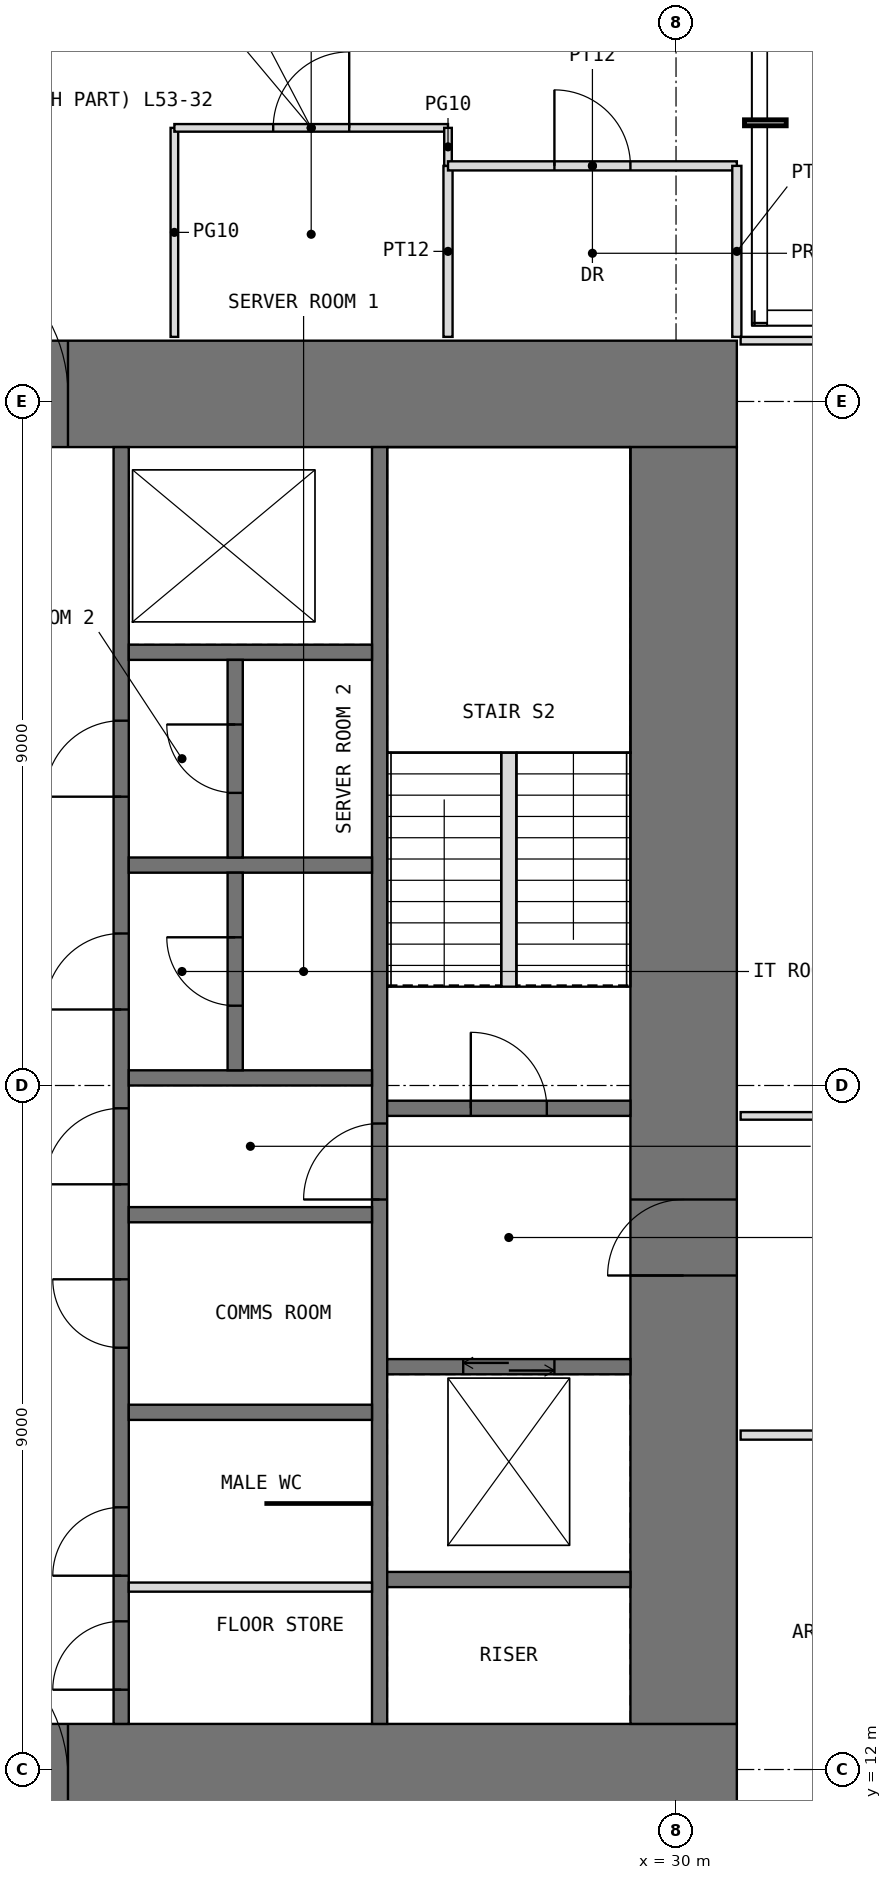
"""IFC4 building model, lengths in metres.
Left out: names, types, materials, properties, quantities, classifications, styles, units other than length and angle.
Written with IfcOpenShell. Run it as: python <this file> out.ifc"""

import sys

from ifc_helpers import new_model, si_unit, direction, frame, frame_2d, origin, place, context, subcontext, project, spatial, rectangle, extrude, element, fill, save


model = new_model("IFC4")
c1 = context("Model", 3, precision=1e-05, world=origin(), true_north=direction((0.0, 1.0)))
c2 = subcontext(c1, "Body", "Model", "MODEL_VIEW")
j1 = project(units=[si_unit("LENGTHUNIT", "METRE"), si_unit("PLANEANGLEUNIT", "RADIAN")], contexts=[c1])
p1 = place(None, origin())
s1 = spatial("IfcSite", under=j1, at=p1, CompositionType="ELEMENT")
p2 = place(p1, origin())
s2 = spatial("IfcBuilding", under=s1, at=p2, CompositionType="ELEMENT")
p3 = place(p2, frame((0.0, 0.0, 222.5)))
s3 = spatial("IfcBuildingStorey", under=s2, at=p3, CompositionType="ELEMENT", Elevation=222.5)
p4 = place(p3, frame((11.2, 11.9, -0.05), z_axis=(0.0, 0.0, 1.0), x_axis=(1.0, 0.0, 0.0)))
e1 = element("IfcWall", 1, at=p4, inside=s3, PredefinedType="SHEAR", context=c2, shape_type="SweptSolid", body=[
    extrude(rectangle(XDim=19.6, YDim=1.4, at=frame_2d((9.8, 0.0))), origin(), (0.0, 0.0, 1.0), 4.0),
])
p5 = place(p4, frame((8.8, 0.0, 0.05)))
e2 = element("IfcOpeningElement", 2, at=p5, cuts=e1, PredefinedType="OPENING", context=c2, shape_type="SweptSolid", body=[
    extrude(rectangle(XDim=2.0, YDim=2.2, at=frame_2d((1.0, 1.1))), frame((0.0, 0.71, 0.0), z_axis=(0.0, -1.0, 0.0), x_axis=(1.0, 0.0, 0.0)), (0.0, 0.0, 1.0), 1.42),
])
p6 = place(p3, frame((11.2, 30.1, -0.05), z_axis=(0.0, 0.0, 1.0), x_axis=(1.0, 0.0, 0.0)))
e3 = element("IfcWall", 3, at=p6, inside=s3, PredefinedType="SHEAR", context=c2, shape_type="SweptSolid", body=[
    extrude(rectangle(XDim=19.6, YDim=1.4, at=frame_2d((9.8, 0.0))), origin(), (0.0, 0.0, 1.0), 4.0),
])
p7 = place(p6, frame((8.8, 0.0, 0.05)))
e4 = element("IfcOpeningElement", 4, at=p7, cuts=e3, PredefinedType="OPENING", context=c2, shape_type="SweptSolid", body=[
    extrude(rectangle(XDim=2.0, YDim=2.2, at=frame_2d((1.0, 1.1))), frame((0.0, 0.71, 0.0), z_axis=(0.0, -1.0, 0.0), x_axis=(1.0, 0.0, 0.0)), (0.0, 0.0, 1.0), 1.42),
])
p8 = place(p3, frame((30.1, 12.6, -0.05), z_axis=(0.0, 0.0, 1.0), x_axis=(0.0, 1.0, 0.0)))
e5 = element("IfcWall", 5, at=p8, inside=s3, PredefinedType="SHEAR", context=c2, shape_type="SweptSolid", body=[
    extrude(rectangle(XDim=16.8, YDim=1.4, at=frame_2d((8.4, 0.0))), origin(), (0.0, 0.0, 1.0), 4.0),
])
p9 = place(p8, frame((5.9, 0.0, 0.05)))
e6 = element("IfcOpeningElement", 6, at=p9, cuts=e5, PredefinedType="OPENING", context=c2, shape_type="SweptSolid", body=[
    extrude(rectangle(XDim=1.0, YDim=2.2, at=frame_2d((0.5, 1.1))), frame((0.0, 0.71, 0.0), z_axis=(0.0, -1.0, 0.0), x_axis=(1.0, 0.0, 0.0)), (0.0, 0.0, 1.0), 1.42),
])
p10 = place(p3, frame((22.7, 12.6, -0.05), z_axis=(0.0, 0.0, 1.0), x_axis=(0.0, 1.0, 0.0)))
e7 = element("IfcWall", 7, at=p10, inside=s3, PredefinedType="SHEAR", context=c2, shape_type="SweptSolid", body=[
    extrude(rectangle(XDim=16.8, YDim=0.2, at=frame_2d((8.4, 0.0))), origin(), (0.0, 0.0, 1.0), 4.0),
])
p11 = place(p10, frame((0.45, 0.0, 0.05)))
e8 = element("IfcOpeningElement", 8, at=p11, cuts=e7, PredefinedType="OPENING", context=c2, shape_type="SweptSolid", body=[
    extrude(rectangle(XDim=0.9, YDim=2.2, at=frame_2d((0.45, 1.1))), frame((0.0, 0.11, 0.0), z_axis=(0.0, -1.0, 0.0), x_axis=(1.0, 0.0, 0.0)), (0.0, 0.0, 1.0), 0.22),
])
p12 = place(p10, frame((7.1, 0.0, 0.05)))
e9 = element("IfcOpeningElement", 9, at=p12, cuts=e7, PredefinedType="OPENING", context=c2, shape_type="SweptSolid", body=[
    extrude(rectangle(XDim=1.0, YDim=2.2, at=frame_2d((0.5, 1.1))), frame((0.0, 0.11, 0.0), z_axis=(0.0, -1.0, 0.0), x_axis=(1.0, 0.0, 0.0)), (0.0, 0.0, 1.0), 0.22),
])
p13 = place(p10, frame((1.95, 0.0, 0.05)))
e10 = element("IfcOpeningElement", 10, at=p13, cuts=e7, PredefinedType="OPENING", context=c2, shape_type="SweptSolid", body=[
    extrude(rectangle(XDim=0.9, YDim=2.2, at=frame_2d((0.45, 1.1))), frame((0.0, 0.11, 0.0), z_axis=(0.0, -1.0, 0.0), x_axis=(1.0, 0.0, 0.0)), (0.0, 0.0, 1.0), 0.22),
])
p14 = place(p10, frame((4.95, 0.0, 0.05)))
e11 = element("IfcOpeningElement", 11, at=p14, cuts=e7, PredefinedType="OPENING", context=c2, shape_type="SweptSolid", body=[
    extrude(rectangle(XDim=0.9, YDim=2.2, at=frame_2d((0.45, 1.1))), frame((0.0, 0.11, 0.0), z_axis=(0.0, -1.0, 0.0), x_axis=(1.0, 0.0, 0.0)), (0.0, 0.0, 1.0), 0.22),
])
p15 = place(p10, frame((9.4, 0.0, 0.05)))
e12 = element("IfcOpeningElement", 12, at=p15, cuts=e7, PredefinedType="OPENING", context=c2, shape_type="SweptSolid", body=[
    extrude(rectangle(XDim=1.0, YDim=2.2, at=frame_2d((0.5, 1.1))), frame((0.0, 0.11, 0.0), z_axis=(0.0, -1.0, 0.0), x_axis=(1.0, 0.0, 0.0)), (0.0, 0.0, 1.0), 0.22),
])
p16 = place(p10, frame((12.2, 0.0, 0.05)))
e13 = element("IfcOpeningElement", 13, at=p16, cuts=e7, PredefinedType="OPENING", context=c2, shape_type="SweptSolid", body=[
    extrude(rectangle(XDim=1.0, YDim=2.2, at=frame_2d((0.5, 1.1))), frame((0.0, 0.11, 0.0), z_axis=(0.0, -1.0, 0.0), x_axis=(1.0, 0.0, 0.0)), (0.0, 0.0, 1.0), 0.22),
])
p17 = place(p3, frame((26.1, 12.6, -0.05), z_axis=(0.0, 0.0, 1.0), x_axis=(0.0, 1.0, 0.0)))
e14 = element("IfcWall", 14, at=p17, inside=s3, PredefinedType="SHEAR", context=c2, shape_type="SweptSolid", body=[
    extrude(rectangle(XDim=16.8, YDim=0.2, at=frame_2d((8.4, 0.0))), origin(), (0.0, 0.0, 1.0), 4.0),
])
p18 = place(p17, frame((6.9, 0.0, 0.05)))
e15 = element("IfcOpeningElement", 15, at=p18, cuts=e14, PredefinedType="OPENING", context=c2, shape_type="SweptSolid", body=[
    extrude(rectangle(XDim=1.0, YDim=2.2, at=frame_2d((0.5, 1.1))), frame((0.0, 0.11, 0.0), z_axis=(0.0, -1.0, 0.0), x_axis=(1.0, 0.0, 0.0)), (0.0, 0.0, 1.0), 0.22),
])
for number, where, z_axis, x_axis in (
    (16, (22.8, 16.7, -0.05), (0.0, 0.0, 1.0), (1.0, 0.0, 0.0)),
    (17, (22.8, 19.3, -0.05), (0.0, 0.0, 1.0), (1.0, 0.0, 0.0)),
    (18, (22.8, 21.1, -0.05), (0.0, 0.0, 1.0), (1.0, 0.0, 0.0)),
    (19, (22.8, 23.9, -0.05), (0.0, 0.0, 1.0), (1.0, 0.0, 0.0)),
    (20, (22.8, 26.7, -0.05), (0.0, 0.0, 1.0), (1.0, 0.0, 0.0)),
    (21, (26.2, 14.5, -0.05), (0.0, 0.0, 1.0), (1.0, 0.0, 0.0)),
):
    element("IfcWall", number, at=place(p3, frame(where, z_axis=z_axis, x_axis=x_axis)), inside=s3, PredefinedType="SHEAR", context=c2, shape_type="SweptSolid", body=[
        extrude(rectangle(XDim=3.2, YDim=0.2, at=frame_2d((1.6, 0.0))), origin(), (0.0, 0.0, 1.0), 4.0),
    ])
p19 = place(p3, frame((26.2, 17.3, -0.05), z_axis=(0.0, 0.0, 1.0), x_axis=(1.0, 0.0, 0.0)))
e22 = element("IfcWall", 22, at=p19, inside=s3, PredefinedType="SHEAR", context=c2, shape_type="SweptSolid", body=[
    extrude(rectangle(XDim=3.2, YDim=0.2, at=frame_2d((1.6, 0.0))), origin(), (0.0, 0.0, 1.0), 4.0),
])
p20 = place(p19, frame((1.0, 0.0, 0.05)))
e23 = element("IfcOpeningElement", 23, at=p20, cuts=e22, PredefinedType="OPENING", context=c2, shape_type="SweptSolid", body=[
    extrude(rectangle(XDim=1.2, YDim=2.2, at=frame_2d((0.6, 1.1))), frame((0.0, 0.11, 0.0), z_axis=(0.0, -1.0, 0.0), x_axis=(1.0, 0.0, 0.0)), (0.0, 0.0, 1.0), 0.22),
])
p21 = place(p3, frame((26.2, 20.7, -0.05), z_axis=(0.0, 0.0, 1.0), x_axis=(1.0, 0.0, 0.0)))
e24 = element("IfcWall", 24, at=p21, inside=s3, PredefinedType="SHEAR", context=c2, shape_type="SweptSolid", body=[
    extrude(rectangle(XDim=3.2, YDim=0.2, at=frame_2d((1.6, 0.0))), origin(), (0.0, 0.0, 1.0), 4.0),
])
p22 = place(p21, frame((1.1, 0.0, 0.05)))
e25 = element("IfcOpeningElement", 25, at=p22, cuts=e24, PredefinedType="OPENING", context=c2, shape_type="SweptSolid", body=[
    extrude(rectangle(XDim=1.0, YDim=2.2, at=frame_2d((0.5, 1.1))), frame((0.0, 0.11, 0.0), z_axis=(0.0, -1.0, 0.0), x_axis=(1.0, 0.0, 0.0)), (0.0, 0.0, 1.0), 0.22),
])
p23 = place(p3, frame((22.8, 14.4, 0.0), z_axis=(0.0, 0.0, 1.0), x_axis=(1.0, 0.0, 0.0)))
e26 = element("IfcWall", 26, at=p23, inside=s3, PredefinedType="PARTITIONING", context=c2, shape_type="SweptSolid", body=[
    extrude(rectangle(XDim=3.2, YDim=0.12, at=frame_2d((1.6, 0.0))), origin(), (0.0, 0.0, 1.0), 3.75),
])
p24 = place(p3, frame((24.6, 15.5, 0.0), z_axis=(0.0, 0.0, 1.0), x_axis=(1.0, 0.0, 0.0)))
e27 = element("IfcWall", 27, at=p24, inside=s3, PredefinedType="PARTITIONING", context=c2, shape_type="SweptSolid", body=[
    extrude(rectangle(XDim=1.4, YDim=0.03, at=frame_2d((0.7, 0.0))), origin(), (0.0, 0.0, 1.0), 3.75),
])
p25 = place(p3, frame((24.2, 21.2, -0.05), z_axis=(0.0, 0.0, 1.0), x_axis=(0.0, 1.0, 0.0)))
e28 = element("IfcWall", 28, at=p25, inside=s3, PredefinedType="SHEAR", context=c2, shape_type="SweptSolid", body=[
    extrude(rectangle(XDim=2.6, YDim=0.2, at=frame_2d((1.3, 0.0))), origin(), (0.0, 0.0, 1.0), 4.0),
])
p26 = place(p25, frame((0.85, 0.0, 0.05)))
e29 = element("IfcOpeningElement", 29, at=p26, cuts=e28, PredefinedType="OPENING", context=c2, shape_type="SweptSolid", body=[
    extrude(rectangle(XDim=0.9, YDim=2.2, at=frame_2d((0.45, 1.1))), frame((0.0, 0.11, 0.0), z_axis=(0.0, -1.0, 0.0), x_axis=(1.0, 0.0, 0.0)), (0.0, 0.0, 1.0), 0.22),
])
p27 = place(p3, frame((24.2, 24.0, -0.05), z_axis=(0.0, 0.0, 1.0), x_axis=(0.0, 1.0, 0.0)))
e30 = element("IfcWall", 30, at=p27, inside=s3, PredefinedType="SHEAR", context=c2, shape_type="SweptSolid", body=[
    extrude(rectangle(XDim=2.6, YDim=0.2, at=frame_2d((1.3, 0.0))), origin(), (0.0, 0.0, 1.0), 4.0),
])
p28 = place(p27, frame((0.85, 0.0, 0.05)))
e31 = element("IfcOpeningElement", 31, at=p28, cuts=e30, PredefinedType="OPENING", context=c2, shape_type="SweptSolid", body=[
    extrude(rectangle(XDim=0.9, YDim=2.2, at=frame_2d((0.45, 1.1))), frame((0.0, 0.11, 0.0), z_axis=(0.0, -1.0, 0.0), x_axis=(1.0, 0.0, 0.0)), (0.0, 0.0, 1.0), 0.22),
])
p29 = place(p3, frame((23.4, 30.85, 0.0), z_axis=(0.0, 0.0, 1.0), x_axis=(0.0, 1.0, 0.0)))
e32 = element("IfcWall", 32, at=p29, inside=s3, PredefinedType="PARTITIONING", context=c2, shape_type="SweptSolid", body=[
    extrude(rectangle(XDim=2.75, YDim=0.1, at=frame_2d((1.375, 0.0))), origin(), (0.0, 0.0, 1.0), 3.75),
])
p30 = place(p3, frame((23.4, 33.6, 0.0), z_axis=(0.0, 0.0, 1.0), x_axis=(1.0, 0.0, 0.0)))
e33 = element("IfcWall", 33, at=p30, inside=s3, PredefinedType="PARTITIONING", context=c2, shape_type="SweptSolid", body=[
    extrude(rectangle(XDim=3.6, YDim=0.1, at=frame_2d((1.8, 0.0))), origin(), (0.0, 0.0, 1.0), 3.75),
])
p31 = place(p30, frame((1.3, 0.0, 0.0)))
e34 = element("IfcOpeningElement", 34, at=p31, cuts=e33, PredefinedType="OPENING", context=c2, shape_type="SweptSolid", body=[
    extrude(rectangle(XDim=1.0, YDim=2.4, at=frame_2d((0.5, 1.2))), frame((0.0, 0.06, 0.0), z_axis=(0.0, -1.0, 0.0), x_axis=(1.0, 0.0, 0.0)), (0.0, 0.0, 1.0), 0.12),
])
p32 = place(p3, frame((27.0, 30.85, 0.0), z_axis=(0.0, 0.0, 1.0), x_axis=(0.0, 1.0, 0.0)))
e35 = element("IfcWall", 35, at=p32, inside=s3, PredefinedType="PARTITIONING", context=c2, shape_type="SweptSolid", body=[
    extrude(rectangle(XDim=2.25, YDim=0.12, at=frame_2d((1.125, 0.0))), origin(), (0.0, 0.0, 1.0), 3.75),
])
p33 = place(p3, frame((27.0, 33.1, 0.0), z_axis=(0.0, 0.0, 1.0), x_axis=(0.0, 1.0, 0.0)))
e36 = element("IfcWall", 36, at=p33, inside=s3, PredefinedType="PARTITIONING", context=c2, shape_type="SweptSolid", body=[
    extrude(rectangle(XDim=0.5, YDim=0.1, at=frame_2d((0.25, 0.0))), origin(), (0.0, 0.0, 1.0), 3.75),
])
p34 = place(p3, frame((27.0, 33.1, 0.0), z_axis=(0.0, 0.0, 1.0), x_axis=(1.0, 0.0, 0.0)))
e37 = element("IfcWall", 37, at=p34, inside=s3, PredefinedType="PARTITIONING", context=c2, shape_type="SweptSolid", body=[
    extrude(rectangle(XDim=3.8, YDim=0.12, at=frame_2d((1.9, 0.0))), origin(), (0.0, 0.0, 1.0), 3.75),
])
p35 = place(p34, frame((1.4, 0.0, 0.0)))
e38 = element("IfcOpeningElement", 38, at=p35, cuts=e37, PredefinedType="OPENING", context=c2, shape_type="SweptSolid", body=[
    extrude(rectangle(XDim=1.0, YDim=2.2, at=frame_2d((0.5, 1.1))), frame((0.0, 0.07, 0.0), z_axis=(0.0, -1.0, 0.0), x_axis=(1.0, 0.0, 0.0)), (0.0, 0.0, 1.0), 0.14),
])
p36 = place(p3, frame((30.8, 30.85, 0.0), z_axis=(0.0, 0.0, 1.0), x_axis=(0.0, 1.0, 0.0)))
e39 = element("IfcWall", 39, at=p36, inside=s3, PredefinedType="PARTITIONING", context=c2, shape_type="SweptSolid", body=[
    extrude(rectangle(XDim=2.25, YDim=0.12, at=frame_2d((1.125, 0.0))), origin(), (0.0, 0.0, 1.0), 3.75),
])
p37 = place(p3, frame((30.85, 16.4, 0.0), z_axis=(0.0, 0.0, 1.0), x_axis=(1.0, 0.0, 0.0)))
e40 = element("IfcWall", 40, at=p37, inside=s3, PredefinedType="PARTITIONING", context=c2, shape_type="SweptSolid", body=[
    extrude(rectangle(XDim=4.45, YDim=0.12, at=frame_2d((2.225, 0.0))), origin(), (0.0, 0.0, 1.0), 3.75),
])
for number, where, z_axis, x_axis in (
    (41, (30.85, 20.6, 0.0), (0.0, 0.0, 1.0), (1.0, 0.0, 0.0)),
    (42, (30.85, 30.8, 0.0), (0.0, 0.0, 1.0), (1.0, 0.0, 0.0)),
):
    element("IfcWall", number, at=place(p3, frame(where, z_axis=z_axis, x_axis=x_axis)), inside=s3, PredefinedType="PARTITIONING", context=c2, shape_type="SweptSolid", body=[
        extrude(rectangle(XDim=4.95, YDim=0.1, at=frame_2d((2.475, 0.0))), origin(), (0.0, 0.0, 1.0), 3.75),
    ])
p38 = place(p3, frame((27.8, 22.3, 0.0), z_axis=(0.0, 0.0, 1.0), x_axis=(0.0, 1.0, 0.0)))
e43 = element("IfcWall", 43, at=p38, inside=s3, PredefinedType="PARTITIONING", context=c2, shape_type="SweptSolid", body=[
    extrude(rectangle(XDim=3.08, YDim=0.2, at=frame_2d((1.54, 0.0))), origin(), (0.0, 0.0, 1.0), 4.0),
])
p39 = place(p5, origin())
e44 = element("IfcDoor", 44, at=p39, inside=s3, OperationType="DOUBLE_DOOR_SINGLE_SWING", PredefinedType="DOOR", context=c2, shape_type="SweptSolid", body=[
    extrude(rectangle(XDim=2.0, YDim=2.2, at=frame_2d((1.0, 1.1))), frame((0.0, 0.025, 0.0), z_axis=(0.0, -1.0, 0.0), x_axis=(1.0, 0.0, 0.0)), (0.0, 0.0, 1.0), 0.05),
])
fill(e2, e44)
p40 = place(p7, origin())
e45 = element("IfcDoor", 45, at=p40, inside=s3, OperationType="DOUBLE_DOOR_SINGLE_SWING", PredefinedType="DOOR", context=c2, shape_type="SweptSolid", body=[
    extrude(rectangle(XDim=2.0, YDim=2.2, at=frame_2d((1.0, 1.1))), frame((0.0, 0.025, 0.0), z_axis=(0.0, -1.0, 0.0), x_axis=(1.0, 0.0, 0.0)), (0.0, 0.0, 1.0), 0.05),
])
fill(e4, e45)
p41 = place(p11, origin())
e46 = element("IfcDoor", 46, at=p41, inside=s3, OperationType="SINGLE_SWING_LEFT", PredefinedType="DOOR", context=c2, shape_type="SweptSolid", body=[
    extrude(rectangle(XDim=0.9, YDim=2.2, at=frame_2d((0.45, 1.1))), frame((0.0, 0.025, 0.0), z_axis=(0.0, -1.0, 0.0), x_axis=(1.0, 0.0, 0.0)), (0.0, 0.0, 1.0), 0.05),
])
fill(e8, e46)
p42 = place(p9, origin())
e47 = element("IfcDoor", 47, at=p42, inside=s3, OperationType="SINGLE_SWING_LEFT", PredefinedType="DOOR", context=c2, shape_type="SweptSolid", body=[
    extrude(rectangle(XDim=1.0, YDim=2.2, at=frame_2d((0.5, 1.1))), frame((0.0, 0.025, 0.0), z_axis=(0.0, -1.0, 0.0), x_axis=(1.0, 0.0, 0.0)), (0.0, 0.0, 1.0), 0.05),
])
fill(e6, e47)
p43 = place(p22, origin())
e48 = element("IfcDoor", 48, at=p43, inside=s3, OperationType="SINGLE_SWING_LEFT", PredefinedType="DOOR", context=c2, shape_type="SweptSolid", body=[
    extrude(rectangle(XDim=1.0, YDim=2.2, at=frame_2d((0.5, 1.1))), frame((0.0, 0.025, 0.0), z_axis=(0.0, -1.0, 0.0), x_axis=(1.0, 0.0, 0.0)), (0.0, 0.0, 1.0), 0.05),
])
fill(e25, e48)
p44 = place(p18, origin())
e49 = element("IfcDoor", 49, at=p44, inside=s3, OperationType="SINGLE_SWING_LEFT", PredefinedType="DOOR", context=c2, shape_type="SweptSolid", body=[
    extrude(rectangle(XDim=1.0, YDim=2.2, at=frame_2d((0.5, 1.1))), frame((0.0, 0.025, 0.0), z_axis=(0.0, -1.0, 0.0), x_axis=(1.0, 0.0, 0.0)), (0.0, 0.0, 1.0), 0.05),
])
fill(e15, e49)
p45 = place(p12, origin())
e50 = element("IfcDoor", 50, at=p45, inside=s3, OperationType="SINGLE_SWING_LEFT", PredefinedType="DOOR", context=c2, shape_type="SweptSolid", body=[
    extrude(rectangle(XDim=1.0, YDim=2.2, at=frame_2d((0.5, 1.1))), frame((0.0, 0.025, 0.0), z_axis=(0.0, -1.0, 0.0), x_axis=(1.0, 0.0, 0.0)), (0.0, 0.0, 1.0), 0.05),
])
fill(e9, e50)
p46 = place(p13, origin())
e51 = element("IfcDoor", 51, at=p46, inside=s3, OperationType="SINGLE_SWING_LEFT", PredefinedType="DOOR", context=c2, shape_type="SweptSolid", body=[
    extrude(rectangle(XDim=0.9, YDim=2.2, at=frame_2d((0.45, 1.1))), frame((0.0, 0.025, 0.0), z_axis=(0.0, -1.0, 0.0), x_axis=(1.0, 0.0, 0.0)), (0.0, 0.0, 1.0), 0.05),
])
fill(e10, e51)
p47 = place(p14, origin())
e52 = element("IfcDoor", 52, at=p47, inside=s3, OperationType="SINGLE_SWING_RIGHT", PredefinedType="DOOR", context=c2, shape_type="SweptSolid", body=[
    extrude(rectangle(XDim=0.9, YDim=2.2, at=frame_2d((0.45, 1.1))), frame((0.0, 0.025, 0.0), z_axis=(0.0, -1.0, 0.0), x_axis=(1.0, 0.0, 0.0)), (0.0, 0.0, 1.0), 0.05),
])
fill(e11, e52)
p48 = place(p15, origin())
e53 = element("IfcDoor", 53, at=p48, inside=s3, OperationType="SINGLE_SWING_LEFT", PredefinedType="DOOR", context=c2, shape_type="SweptSolid", body=[
    extrude(rectangle(XDim=1.0, YDim=2.2, at=frame_2d((0.5, 1.1))), frame((0.0, 0.025, 0.0), z_axis=(0.0, -1.0, 0.0), x_axis=(1.0, 0.0, 0.0)), (0.0, 0.0, 1.0), 0.05),
])
fill(e12, e53)
p49 = place(p26, origin())
e54 = element("IfcDoor", 54, at=p49, inside=s3, OperationType="SINGLE_SWING_RIGHT", PredefinedType="DOOR", context=c2, shape_type="SweptSolid", body=[
    extrude(rectangle(XDim=0.9, YDim=2.2, at=frame_2d((0.45, 1.1))), frame((0.0, 0.025, 0.0), z_axis=(0.0, -1.0, 0.0), x_axis=(1.0, 0.0, 0.0)), (0.0, 0.0, 1.0), 0.05),
])
fill(e29, e54)
p50 = place(p16, origin())
e55 = element("IfcDoor", 55, at=p50, inside=s3, OperationType="SINGLE_SWING_LEFT", PredefinedType="DOOR", context=c2, shape_type="SweptSolid", body=[
    extrude(rectangle(XDim=1.0, YDim=2.2, at=frame_2d((0.5, 1.1))), frame((0.0, 0.025, 0.0), z_axis=(0.0, -1.0, 0.0), x_axis=(1.0, 0.0, 0.0)), (0.0, 0.0, 1.0), 0.05),
])
fill(e13, e55)
p51 = place(p28, origin())
e56 = element("IfcDoor", 56, at=p51, inside=s3, OperationType="SINGLE_SWING_RIGHT", PredefinedType="DOOR", context=c2, shape_type="SweptSolid", body=[
    extrude(rectangle(XDim=0.9, YDim=2.2, at=frame_2d((0.45, 1.1))), frame((0.0, 0.025, 0.0), z_axis=(0.0, -1.0, 0.0), x_axis=(1.0, 0.0, 0.0)), (0.0, 0.0, 1.0), 0.05),
])
fill(e31, e56)
p52 = place(p31, origin())
e57 = element("IfcDoor", 57, at=p52, inside=s3, OperationType="SINGLE_SWING_RIGHT", PredefinedType="DOOR", context=c2, shape_type="SweptSolid", body=[
    extrude(rectangle(XDim=1.0, YDim=2.4, at=frame_2d((0.5, 1.2))), frame((0.0, 0.025, 0.0), z_axis=(0.0, -1.0, 0.0), x_axis=(1.0, 0.0, 0.0)), (0.0, 0.0, 1.0), 0.05),
])
fill(e34, e57)
p53 = place(p35, origin())
e58 = element("IfcDoor", 58, at=p53, inside=s3, OperationType="SINGLE_SWING_LEFT", PredefinedType="DOOR", context=c2, shape_type="SweptSolid", body=[
    extrude(rectangle(XDim=1.0, YDim=2.2, at=frame_2d((0.5, 1.1))), frame((0.0, 0.025, 0.0), z_axis=(0.0, -1.0, 0.0), x_axis=(1.0, 0.0, 0.0)), (0.0, 0.0, 1.0), 0.05),
])
fill(e38, e58)
p54 = place(p20, origin())
e59 = element("IfcDoor", 59, at=p54, inside=s3, OperationType="DOUBLE_DOOR_SLIDING", PredefinedType="DOOR", context=c2, shape_type="SweptSolid", body=[
    extrude(rectangle(XDim=1.2, YDim=2.2, at=frame_2d((0.6, 1.1))), frame((0.0, 0.025, 0.0), z_axis=(0.0, -1.0, 0.0), x_axis=(1.0, 0.0, 0.0)), (0.0, 0.0, 1.0), 0.05),
])
fill(e23, e59)
save(model, sys.argv[1])
